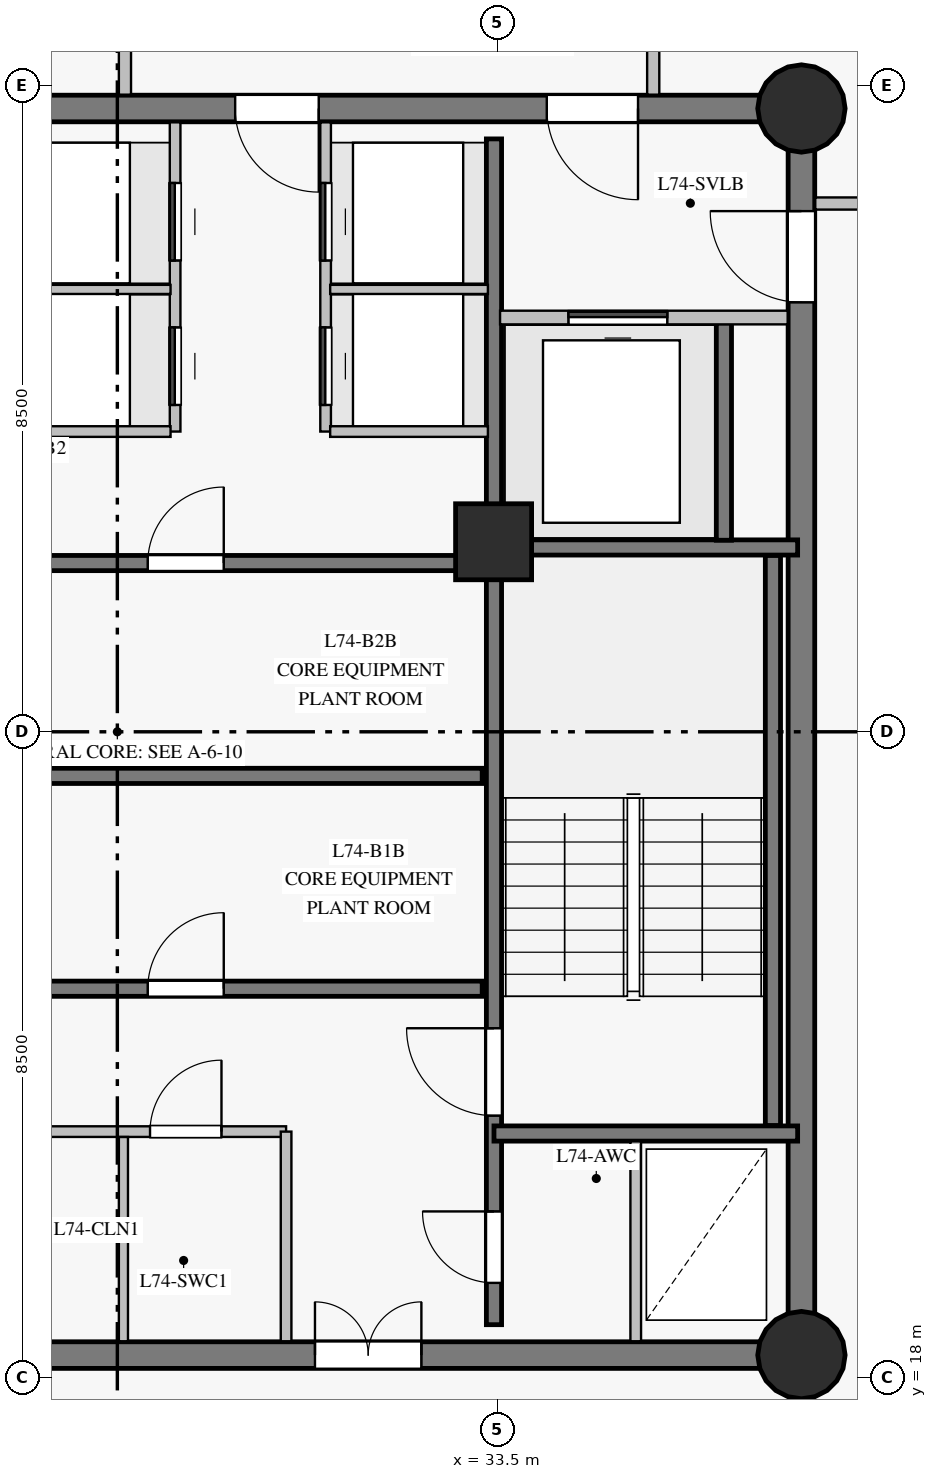
"""IFC4 building model, lengths in metres.
Left out: names, types, materials, properties, quantities, classifications, styles, units other than length and angle.
Written with IfcOpenShell. Run it as: python <this file> out.ifc"""

import sys

from ifc_helpers import new_model, si_unit, direction, frame, frame_2d, origin, origin_with_axes, origin_2d, place, context, subcontext, project, spatial, rectangle, circle, extrude, source, transform, mapped, element, fill, save


model = new_model("IFC4")
c1 = context("Model", 3, precision=1e-05, world=origin(), true_north=direction((0.0, 1.0)))
c2 = subcontext(c1, "Body", "Model", "MODEL_VIEW")
j1 = project(units=[si_unit("LENGTHUNIT", "METRE"), si_unit("PLANEANGLEUNIT", "RADIAN")], contexts=[c1])
p1 = place(None, origin())
s1 = spatial("IfcSite", under=j1, at=p1, CompositionType="ELEMENT")
p2 = place(p1, origin())
s2 = spatial("IfcBuilding", under=s1, at=p2, CompositionType="ELEMENT")
p3 = place(p2, frame((0.0, 0.0, 250.45)))
s3 = spatial("IfcBuildingStorey", under=s2, at=p3, CompositionType="ELEMENT", Elevation=250.45)
p4 = place(p3, frame((26.55, 18.3, 0.0), z_axis=(0.0, 0.0, 1.0), x_axis=(1.0, 0.0, 0.0)))
e1 = element("IfcWall", 1, at=p4, inside=s3, PredefinedType="SHEAR", context=c2, shape_type="SweptSolid", body=[
    extrude(rectangle(XDim=10.95, YDim=0.35, at=frame_2d((5.475, 0.0))), origin(), (0.0, 0.0, 1.0), 2.85),
])
p5 = place(p4, frame((4.55, 0.0, 0.0)))
e2 = element("IfcOpeningElement", 2, at=p5, cuts=e1, PredefinedType="OPENING", context=c2, shape_type="SweptSolid", body=[
    extrude(rectangle(XDim=1.4, YDim=2.2, at=frame_2d((0.7, 1.1))), frame((0.0, 0.185, 0.0), z_axis=(0.0, -1.0, 0.0), x_axis=(1.0, 0.0, 0.0)), (0.0, 0.0, 1.0), 0.37),
])
p6 = place(p3, frame((37.5, 18.3, 0.0), z_axis=(0.0, 0.0, 1.0), x_axis=(0.0, 1.0, 0.0)))
e3 = element("IfcWall", 3, at=p6, inside=s3, PredefinedType="SHEAR", context=c2, shape_type="SweptSolid", body=[
    extrude(rectangle(XDim=16.4, YDim=0.35, at=frame_2d((8.2, 0.0))), origin(), (0.0, 0.0, 1.0), 2.85),
])
p7 = place(p6, frame((13.85, 0.0, 0.0)))
e4 = element("IfcOpeningElement", 4, at=p7, cuts=e3, PredefinedType="OPENING", context=c2, shape_type="SweptSolid", body=[
    extrude(rectangle(XDim=1.2, YDim=2.15, at=frame_2d((0.6, 1.075))), frame((0.0, 0.185, 0.0), z_axis=(0.0, -1.0, 0.0), x_axis=(1.0, 0.0, 0.0)), (0.0, 0.0, 1.0), 0.37),
])
p8 = place(p3, frame((37.5, 34.7, 0.0), z_axis=(0.0, 0.0, 1.0), x_axis=(-1.0, 0.0, 0.0)))
e5 = element("IfcWall", 5, at=p8, inside=s3, PredefinedType="SHEAR", context=c2, shape_type="SweptSolid", body=[
    extrude(rectangle(XDim=10.95, YDim=0.35, at=frame_2d((5.475, 0.0))), origin(), (0.0, 0.0, 1.0), 2.85),
])
p9 = place(p8, frame((2.15, 0.0, 0.0)))
e6 = element("IfcOpeningElement", 6, at=p9, cuts=e5, PredefinedType="OPENING", context=c2, shape_type="SweptSolid", body=[
    extrude(rectangle(XDim=1.2, YDim=2.15, at=frame_2d((0.6, 1.075))), frame((0.0, 0.185, 0.0), z_axis=(0.0, -1.0, 0.0), x_axis=(1.0, 0.0, 0.0)), (0.0, 0.0, 1.0), 0.37),
])
p10 = place(p8, frame((6.35, 0.0, 0.0)))
e7 = element("IfcOpeningElement", 7, at=p10, cuts=e5, PredefinedType="OPENING", context=c2, shape_type="SweptSolid", body=[
    extrude(rectangle(XDim=1.1, YDim=2.15, at=frame_2d((0.55, 1.075))), frame((0.0, 0.185, 0.0), z_axis=(0.0, -1.0, 0.0), x_axis=(1.0, 0.0, 0.0)), (0.0, 0.0, 1.0), 0.37),
])
m1 = source(origin_with_axes(), c2, "Body", "SweptSolid", [
    extrude(circle(Radius=0.575, at=origin_2d()), origin(), (0.0, 0.0, 1.0), 3.05),
])
for number, where, z_axis, x_axis in (
    (8, (37.5, 18.3, 0.0), (0.0, 0.0, 1.0), (1.0, 0.0, 0.0)),
    (9, (37.5, 34.7, 0.0), (0.0, 0.0, 1.0), (1.0, 0.0, 0.0)),
):
    element("IfcColumn", number, at=place(p3, frame(where, z_axis=z_axis, x_axis=x_axis)), inside=s3, PredefinedType="COLUMN", context=c2, shape_type="MappedRepresentation", body=[
        mapped(m1, transform((0.0, 0.0, 0.0), scale=1.0)),
    ])
m2 = source(origin_with_axes(), c2, "Body", "SweptSolid", [
    extrude(rectangle(XDim=1.0, YDim=1.0, at=origin_2d()), origin(), (0.0, 0.0, 1.0), 3.05),
])
p11 = place(p3, frame((33.45, 29.0, 0.0), z_axis=(0.0, 0.0, 1.0), x_axis=(1.0, 0.0, 0.0)))
e10 = element("IfcColumn", 10, at=p11, inside=s3, PredefinedType="COLUMN", context=c2, shape_type="MappedRepresentation", body=[
    mapped(m2, transform((0.0, 0.0, 0.0), scale=1.0)),
])
p12 = place(p3, frame((33.455, 18.7, 0.0), z_axis=(0.0, 0.0, 1.0), x_axis=(0.0, 1.0, 0.0)))
e11 = element("IfcWall", 11, at=p12, inside=s3, PredefinedType="SHEAR", context=c2, shape_type="SweptSolid", body=[
    extrude(rectangle(XDim=15.6, YDim=0.2, at=frame_2d((7.8, 0.0))), origin(), (0.0, 0.0, 1.0), 2.85),
])
p13 = place(p12, frame((2.75, 0.0, 0.0)))
e12 = element("IfcOpeningElement", 12, at=p13, cuts=e11, PredefinedType="OPENING", context=c2, shape_type="SweptSolid", body=[
    extrude(rectangle(XDim=1.15, YDim=2.15, at=frame_2d((0.575, 1.075))), frame((0.0, 0.11, 0.0), z_axis=(0.0, -1.0, 0.0), x_axis=(1.0, 0.0, 0.0)), (0.0, 0.0, 1.0), 0.22),
])
p14 = place(p12, frame((0.55, 0.0, 0.0)))
e13 = element("IfcOpeningElement", 13, at=p14, cuts=e11, PredefinedType="OPENING", context=c2, shape_type="SweptSolid", body=[
    extrude(rectangle(XDim=0.94, YDim=2.1, at=frame_2d((0.47, 1.05))), frame((0.0, 0.11, 0.0), z_axis=(0.0, -1.0, 0.0), x_axis=(1.0, 0.0, 0.0)), (0.0, 0.0, 1.0), 0.22),
])
p15 = place(p3, frame((23.7, 23.12, 0.0), z_axis=(0.0, 0.0, 1.0), x_axis=(1.0, 0.0, 0.0)))
e14 = element("IfcWall", 14, at=p15, inside=s3, PredefinedType="SHEAR", context=c2, shape_type="SweptSolid", body=[
    extrude(rectangle(XDim=9.6, YDim=0.2, at=frame_2d((4.8, 0.0))), origin(), (0.0, 0.0, 1.0), 2.85),
])
p16 = place(p15, frame((1.1, 0.0, 0.0)))
e15 = element("IfcOpeningElement", 15, at=p16, cuts=e14, PredefinedType="OPENING", context=c2, shape_type="SweptSolid", body=[
    extrude(rectangle(XDim=0.92, YDim=2.1, at=frame_2d((0.46, 1.05))), frame((0.0, 0.11, 0.0), z_axis=(0.0, -1.0, 0.0), x_axis=(1.0, 0.0, 0.0)), (0.0, 0.0, 1.0), 0.22),
])
p17 = place(p15, frame((5.2, 0.0, 0.0)))
e16 = element("IfcOpeningElement", 16, at=p17, cuts=e14, PredefinedType="OPENING", context=c2, shape_type="SweptSolid", body=[
    extrude(rectangle(XDim=1.0, YDim=2.15, at=frame_2d((0.5, 1.075))), frame((0.0, 0.11, 0.0), z_axis=(0.0, -1.0, 0.0), x_axis=(1.0, 0.0, 0.0)), (0.0, 0.0, 1.0), 0.22),
])
p18 = place(p3, frame((23.7, 25.92, 0.0), z_axis=(0.0, 0.0, 1.0), x_axis=(1.0, 0.0, 0.0)))
e17 = element("IfcWall", 17, at=p18, inside=s3, PredefinedType="SHEAR", context=c2, shape_type="SweptSolid", body=[
    extrude(rectangle(XDim=9.6, YDim=0.2, at=frame_2d((4.8, 0.0))), origin(), (0.0, 0.0, 1.0), 2.85),
])
p19 = place(p3, frame((23.7, 28.72, 0.0), z_axis=(0.0, 0.0, 1.0), x_axis=(1.0, 0.0, 0.0)))
e18 = element("IfcWall", 18, at=p19, inside=s3, PredefinedType="SHEAR", context=c2, shape_type="SweptSolid", body=[
    extrude(rectangle(XDim=9.6, YDim=0.2, at=frame_2d((4.8, 0.0))), origin(), (0.0, 0.0, 1.0), 2.85),
])
p20 = place(p19, frame((1.1, 0.0, 0.0)))
e19 = element("IfcOpeningElement", 19, at=p20, cuts=e18, PredefinedType="OPENING", context=c2, shape_type="SweptSolid", body=[
    extrude(rectangle(XDim=0.92, YDim=2.1, at=frame_2d((0.46, 1.05))), frame((0.0, 0.11, 0.0), z_axis=(0.0, -1.0, 0.0), x_axis=(1.0, 0.0, 0.0)), (0.0, 0.0, 1.0), 0.22),
])
p21 = place(p19, frame((5.2, 0.0, 0.0)))
e20 = element("IfcOpeningElement", 20, at=p21, cuts=e18, PredefinedType="OPENING", context=c2, shape_type="SweptSolid", body=[
    extrude(rectangle(XDim=1.0, YDim=2.15, at=frame_2d((0.5, 1.075))), frame((0.0, 0.11, 0.0), z_axis=(0.0, -1.0, 0.0), x_axis=(1.0, 0.0, 0.0)), (0.0, 0.0, 1.0), 0.22),
])
p22 = place(p3, frame((37.125, 21.32, 0.0), z_axis=(0.0, 0.0, 1.0), x_axis=(0.0, 1.0, 0.0)))
e21 = element("IfcWall", 21, at=p22, inside=s3, PredefinedType="SHEAR", context=c2, shape_type="SweptSolid", body=[
    extrude(rectangle(XDim=7.5, YDim=0.2, at=frame_2d((3.75, 0.0))), origin(), (0.0, 0.0, 1.0), 2.85),
])
for number, where, z_axis, x_axis in (
    (22, (33.455, 21.215, 0.0), (0.0, 0.0, 1.0), (1.0, 0.0, 0.0)),
    (23, (33.455, 28.925, 0.0), (0.0, 0.0, 1.0), (1.0, 0.0, 0.0)),
):
    element("IfcWall", number, at=place(p3, frame(where, z_axis=z_axis, x_axis=x_axis)), inside=s3, PredefinedType="SHEAR", context=c2, shape_type="SweptSolid", body=[
        extrude(rectangle(XDim=3.995, YDim=0.2, at=frame_2d((1.998, 0.0))), origin(), (0.0, 0.0, 1.0), 2.85),
    ])
p23 = place(p3, frame((36.48, 29.02, 0.0), z_axis=(0.0, 0.0, 1.0), x_axis=(0.0, 1.0, 0.0)))
e24 = element("IfcWall", 24, at=p23, inside=s3, PredefinedType="SHEAR", context=c2, shape_type="SweptSolid", body=[
    extrude(rectangle(XDim=2.86, YDim=0.2, at=frame_2d((1.43, 0.0))), origin(), (0.0, 0.0, 1.0), 2.85),
])
p24 = place(p3, frame((37.682, 33.45, 0.0), z_axis=(0.0, 0.0, 1.0), x_axis=(1.0, 0.0, 0.0)))
e25 = element("IfcWall", 25, at=p24, inside=s3, PredefinedType="PARTITIONING", context=c2, shape_type="SweptSolid", body=[
    extrude(rectangle(XDim=4.118, YDim=0.16, at=frame_2d((2.059, 0.0))), origin(), (0.0, 0.0, 1.0), 2.85),
])
p25 = place(p3, frame((29.26, 30.45, 0.0), z_axis=(0.0, 0.0, 1.0), x_axis=(0.0, 1.0, 0.0)))
e26 = element("IfcWall", 26, at=p25, inside=s3, PredefinedType="PARTITIONING", context=c2, shape_type="SweptSolid", body=[
    extrude(rectangle(XDim=4.068, YDim=0.14, at=frame_2d((2.034, 0.0))), origin(), (0.0, 0.0, 1.0), 2.85),
])
p26 = place(p25, frame((0.35, 0.0, 0.0)))
e27 = element("IfcOpeningElement", 27, at=p26, cuts=e26, PredefinedType="OPENING", context=c2, shape_type="SweptSolid", body=[
    extrude(rectangle(XDim=1.02, YDim=2.15, at=frame_2d((0.51, 1.075))), frame((0.0, 0.08, 0.0), z_axis=(0.0, -1.0, 0.0), x_axis=(1.0, 0.0, 0.0)), (0.0, 0.0, 1.0), 0.16),
])
p27 = place(p25, frame((2.25, 0.0, 0.0)))
e28 = element("IfcOpeningElement", 28, at=p27, cuts=e26, PredefinedType="OPENING", context=c2, shape_type="SweptSolid", body=[
    extrude(rectangle(XDim=1.02, YDim=2.15, at=frame_2d((0.51, 1.075))), frame((0.0, 0.08, 0.0), z_axis=(0.0, -1.0, 0.0), x_axis=(1.0, 0.0, 0.0)), (0.0, 0.0, 1.0), 0.16),
])
p28 = place(p3, frame((31.24, 30.45, 0.0), z_axis=(0.0, 0.0, 1.0), x_axis=(0.0, 1.0, 0.0)))
e29 = element("IfcWall", 29, at=p28, inside=s3, PredefinedType="PARTITIONING", context=c2, shape_type="SweptSolid", body=[
    extrude(rectangle(XDim=4.068, YDim=0.14, at=frame_2d((2.034, 0.0))), origin(), (0.0, 0.0, 1.0), 2.85),
])
p29 = place(p28, frame((0.35, 0.0, 0.0)))
e30 = element("IfcOpeningElement", 30, at=p29, cuts=e29, PredefinedType="OPENING", context=c2, shape_type="SweptSolid", body=[
    extrude(rectangle(XDim=1.02, YDim=2.15, at=frame_2d((0.51, 1.075))), frame((0.0, 0.08, 0.0), z_axis=(0.0, -1.0, 0.0), x_axis=(1.0, 0.0, 0.0)), (0.0, 0.0, 1.0), 0.16),
])
p30 = place(p28, frame((2.25, 0.0, 0.0)))
e31 = element("IfcOpeningElement", 31, at=p30, cuts=e29, PredefinedType="OPENING", context=c2, shape_type="SweptSolid", body=[
    extrude(rectangle(XDim=1.02, YDim=2.15, at=frame_2d((0.51, 1.075))), frame((0.0, 0.08, 0.0), z_axis=(0.0, -1.0, 0.0), x_axis=(1.0, 0.0, 0.0)), (0.0, 0.0, 1.0), 0.16),
])
p31 = place(p3, frame((33.535, 31.95, 0.0), z_axis=(0.0, 0.0, 1.0), x_axis=(1.0, 0.0, 0.0)))
e32 = element("IfcWall", 32, at=p31, inside=s3, PredefinedType="PARTITIONING", context=c2, shape_type="SweptSolid", body=[
    extrude(rectangle(XDim=3.784, YDim=0.18, at=frame_2d((1.892, 0.0))), origin(), (0.0, 0.0, 1.0), 2.85),
])
p32 = place(p31, frame((0.9, 0.0, 0.0)))
e33 = element("IfcOpeningElement", 33, at=p32, cuts=e32, PredefinedType="OPENING", context=c2, shape_type="SweptSolid", body=[
    extrude(rectangle(XDim=1.3, YDim=2.2, at=frame_2d((0.65, 1.1))), frame((0.0, 0.1, 0.0), z_axis=(0.0, -1.0, 0.0), x_axis=(1.0, 0.0, 0.0)), (0.0, 0.0, 1.0), 0.2),
])
p33 = place(p3, frame((27.28, 21.24, 0.0), z_axis=(0.0, 0.0, 1.0), x_axis=(1.0, 0.0, 0.0)))
e34 = element("IfcWall", 34, at=p33, inside=s3, PredefinedType="PARTITIONING", context=c2, shape_type="SweptSolid", body=[
    extrude(rectangle(XDim=3.44, YDim=0.14, at=frame_2d((1.72, 0.0))), origin(), (0.0, 0.0, 1.0), 2.85),
])
p34 = place(p33, frame((1.65, 0.0, 0.0)))
e35 = element("IfcOpeningElement", 35, at=p34, cuts=e34, PredefinedType="OPENING", context=c2, shape_type="SweptSolid", body=[
    extrude(rectangle(XDim=0.94, YDim=2.1, at=frame_2d((0.47, 1.05))), frame((0.0, 0.08, 0.0), z_axis=(0.0, -1.0, 0.0), x_axis=(1.0, 0.0, 0.0)), (0.0, 0.0, 1.0), 0.16),
])
p35 = place(p3, frame((30.72, 18.482, 0.0), z_axis=(0.0, 0.0, 1.0), x_axis=(0.0, 1.0, 0.0)))
e36 = element("IfcWall", 36, at=p35, inside=s3, PredefinedType="PARTITIONING", context=c2, shape_type="SweptSolid", body=[
    extrude(rectangle(XDim=2.758, YDim=0.14, at=frame_2d((1.379, 0.0))), origin(), (0.0, 0.0, 1.0), 2.85),
])
p36 = place(p3, frame((26.62, 30.45, 0.0), z_axis=(0.0, 0.0, 1.0), x_axis=(1.0, 0.0, 0.0)))
e37 = element("IfcWall", 37, at=p36, inside=s3, PredefinedType="PARTITIONING", context=c2, shape_type="SweptSolid", body=[
    extrude(rectangle(XDim=2.58, YDim=0.14, at=frame_2d((1.29, 0.0))), origin(), (0.0, 0.0, 1.0), 2.85),
])
p37 = place(p3, frame((26.62, 32.32, 0.0), z_axis=(0.0, 0.0, 1.0), x_axis=(1.0, 0.0, 0.0)))
e38 = element("IfcWall", 38, at=p37, inside=s3, PredefinedType="PARTITIONING", context=c2, shape_type="SweptSolid", body=[
    extrude(rectangle(XDim=2.58, YDim=0.12, at=frame_2d((1.29, 0.0))), origin(), (0.0, 0.0, 1.0), 2.85),
])
p38 = place(p3, frame((28.58, 18.482, 0.0), z_axis=(0.0, 0.0, 1.0), x_axis=(0.0, 1.0, 0.0)))
e39 = element("IfcWall", 39, at=p38, inside=s3, PredefinedType="PARTITIONING", context=c2, shape_type="SweptSolid", body=[
    extrude(rectangle(XDim=2.687, YDim=0.12, at=frame_2d((1.344, 0.0))), origin(), (0.0, 0.0, 1.0), 2.85),
])
p39 = place(p3, frame((35.32, 18.482, 0.0), z_axis=(0.0, 0.0, 1.0), x_axis=(0.0, 1.0, 0.0)))
e40 = element("IfcWall", 40, at=p39, inside=s3, PredefinedType="PARTITIONING", context=c2, shape_type="SweptSolid", body=[
    extrude(rectangle(XDim=2.629, YDim=0.14, at=frame_2d((1.314, 0.0))), origin(), (0.0, 0.0, 1.0), 2.85),
])
p40 = place(p3, frame((31.3, 30.45, 0.0), z_axis=(0.0, 0.0, 1.0), x_axis=(1.0, 0.0, 0.0)))
e41 = element("IfcWall", 41, at=p40, inside=s3, PredefinedType="PARTITIONING", context=c2, shape_type="SweptSolid", body=[
    extrude(rectangle(XDim=2.075, YDim=0.14, at=frame_2d((1.038, 0.0))), origin(), (0.0, 0.0, 1.0), 2.85),
])
p41 = place(p3, frame((31.3, 32.32, 0.0), z_axis=(0.0, 0.0, 1.0), x_axis=(1.0, 0.0, 0.0)))
e42 = element("IfcWall", 42, at=p41, inside=s3, PredefinedType="PARTITIONING", context=c2, shape_type="SweptSolid", body=[
    extrude(rectangle(XDim=2.075, YDim=0.12, at=frame_2d((1.038, 0.0))), origin(), (0.0, 0.0, 1.0), 2.85),
])
for number, where, z_axis, x_axis in (
    (43, (28.6, 34.882, 0.0), (0.0, 0.0, 1.0), (0.0, 1.0, 0.0)),
    (44, (35.55, 36.4, 0.0), (0.0, 0.0, 1.0), (0.0, -1.0, 0.0)),
):
    element("IfcWall", number, at=place(p3, frame(where, z_axis=z_axis, x_axis=x_axis)), inside=s3, PredefinedType="PARTITIONING", context=c2, shape_type="SweptSolid", body=[
        extrude(rectangle(XDim=1.518, YDim=0.16, at=frame_2d((0.759, 0.0))), origin(), (0.0, 0.0, 1.0), 2.85),
    ])
m3 = source(origin_with_axes(), c2, "Body", "SweptSolid", [
    extrude(rectangle(XDim=1.15, YDim=2.15, at=frame_2d((0.575, 1.075))), frame((0.0, 0.025, 0.0), z_axis=(0.0, -1.0, 0.0), x_axis=(1.0, 0.0, 0.0)), (0.0, 0.0, 1.0), 0.05),
])
p42 = place(p13, origin())
e45 = element("IfcDoor", 45, at=p42, inside=s3, OperationType="SINGLE_SWING_RIGHT", PredefinedType="DOOR", context=c2, shape_type="MappedRepresentation", body=[
    mapped(m3, transform((0.0, 0.0, 0.0), scale=1.0)),
])
fill(e12, e45)
m4 = source(origin_with_axes(), c2, "Body", "SweptSolid", [
    extrude(rectangle(XDim=1.2, YDim=2.15, at=frame_2d((0.6, 1.075))), frame((0.0, 0.025, 0.0), z_axis=(0.0, -1.0, 0.0), x_axis=(1.0, 0.0, 0.0)), (0.0, 0.0, 1.0), 0.05),
])
p43 = place(p7, origin())
e46 = element("IfcDoor", 46, at=p43, inside=s3, OperationType="SINGLE_SWING_RIGHT", PredefinedType="DOOR", context=c2, shape_type="MappedRepresentation", body=[
    mapped(m4, transform((0.0, 0.0, 0.0), scale=1.0)),
])
fill(e4, e46)
p44 = place(p9, origin())
e47 = element("IfcDoor", 47, at=p44, inside=s3, OperationType="SINGLE_SWING_LEFT", PredefinedType="DOOR", context=c2, shape_type="MappedRepresentation", body=[
    mapped(m4, transform((0.0, 0.0, 0.0), scale=1.0)),
])
fill(e6, e47)
m5 = source(origin_with_axes(), c2, "Body", "SweptSolid", [
    extrude(rectangle(XDim=1.3, YDim=2.2, at=frame_2d((0.65, 1.1))), frame((0.0, 0.025, 0.0), z_axis=(0.0, -1.0, 0.0), x_axis=(1.0, 0.0, 0.0)), (0.0, 0.0, 1.0), 0.05),
])
p45 = place(p32, origin())
e48 = element("IfcDoor", 48, at=p45, inside=s3, OperationType="SLIDING_TO_LEFT", PredefinedType="DOOR", context=c2, shape_type="MappedRepresentation", body=[
    mapped(m5, transform((0.0, 0.0, 0.0), scale=1.0)),
])
fill(e33, e48)
m6 = source(origin_with_axes(), c2, "Body", "SweptSolid", [
    extrude(rectangle(XDim=1.4, YDim=2.2, at=frame_2d((0.7, 1.1))), frame((0.0, 0.025, 0.0), z_axis=(0.0, -1.0, 0.0), x_axis=(1.0, 0.0, 0.0)), (0.0, 0.0, 1.0), 0.05),
])
p46 = place(p5, origin())
e49 = element("IfcDoor", 49, at=p46, inside=s3, OperationType="DOUBLE_DOOR_SINGLE_SWING", PredefinedType="DOOR", context=c2, shape_type="MappedRepresentation", body=[
    mapped(m6, transform((0.0, 0.0, 0.0), scale=1.0)),
])
fill(e2, e49)
m7 = source(origin_with_axes(), c2, "Body", "SweptSolid", [
    extrude(rectangle(XDim=0.94, YDim=2.1, at=frame_2d((0.47, 1.05))), frame((0.0, 0.025, 0.0), z_axis=(0.0, -1.0, 0.0), x_axis=(1.0, 0.0, 0.0)), (0.0, 0.0, 1.0), 0.05),
])
p47 = place(p14, origin())
e50 = element("IfcDoor", 50, at=p47, inside=s3, OperationType="SINGLE_SWING_RIGHT", PredefinedType="DOOR", context=c2, shape_type="MappedRepresentation", body=[
    mapped(m7, transform((0.0, 0.0, 0.0), scale=1.0)),
])
fill(e13, e50)
p48 = place(p34, origin())
e51 = element("IfcDoor", 51, at=p48, inside=s3, OperationType="SINGLE_SWING_RIGHT", PredefinedType="DOOR", context=c2, shape_type="MappedRepresentation", body=[
    mapped(m7, transform((0.0, 0.0, 0.0), scale=1.0)),
])
fill(e35, e51)
m8 = source(origin_with_axes(), c2, "Body", "SweptSolid", [
    extrude(rectangle(XDim=1.0, YDim=2.15, at=frame_2d((0.5, 1.075))), frame((0.0, 0.025, 0.0), z_axis=(0.0, -1.0, 0.0), x_axis=(1.0, 0.0, 0.0)), (0.0, 0.0, 1.0), 0.05),
])
p49 = place(p17, origin())
e52 = element("IfcDoor", 52, at=p49, inside=s3, OperationType="SINGLE_SWING_RIGHT", PredefinedType="DOOR", context=c2, shape_type="MappedRepresentation", body=[
    mapped(m8, transform((0.0, 0.0, 0.0), scale=1.0)),
])
fill(e16, e52)
p50 = place(p21, origin())
e53 = element("IfcDoor", 53, at=p50, inside=s3, OperationType="SINGLE_SWING_RIGHT", PredefinedType="DOOR", context=c2, shape_type="MappedRepresentation", body=[
    mapped(m8, transform((0.0, 0.0, 0.0), scale=1.0)),
])
fill(e20, e53)
m9 = source(origin_with_axes(), c2, "Body", "SweptSolid", [
    extrude(rectangle(XDim=1.1, YDim=2.15, at=frame_2d((0.55, 1.075))), frame((0.0, 0.025, 0.0), z_axis=(0.0, -1.0, 0.0), x_axis=(1.0, 0.0, 0.0)), (0.0, 0.0, 1.0), 0.05),
])
p51 = place(p10, origin())
e54 = element("IfcDoor", 54, at=p51, inside=s3, OperationType="SINGLE_SWING_LEFT", PredefinedType="DOOR", context=c2, shape_type="MappedRepresentation", body=[
    mapped(m9, transform((0.0, 0.0, 0.0), scale=1.0)),
])
fill(e7, e54)
m10 = source(origin_with_axes(), c2, "Body", "SweptSolid", [
    extrude(rectangle(XDim=1.02, YDim=2.15, at=frame_2d((0.51, 1.075))), frame((0.0, 0.025, 0.0), z_axis=(0.0, -1.0, 0.0), x_axis=(1.0, 0.0, 0.0)), (0.0, 0.0, 1.0), 0.05),
])
p52 = place(p26, origin())
e55 = element("IfcDoor", 55, at=p52, inside=s3, OperationType="SLIDING_TO_LEFT", PredefinedType="DOOR", context=c2, shape_type="MappedRepresentation", body=[
    mapped(m10, transform((0.0, 0.0, 0.0), scale=1.0)),
])
fill(e27, e55)
p53 = place(p27, origin())
e56 = element("IfcDoor", 56, at=p53, inside=s3, OperationType="SLIDING_TO_LEFT", PredefinedType="DOOR", context=c2, shape_type="MappedRepresentation", body=[
    mapped(m10, transform((0.0, 0.0, 0.0), scale=1.0)),
])
fill(e28, e56)
p54 = place(p29, origin())
e57 = element("IfcDoor", 57, at=p54, inside=s3, OperationType="SLIDING_TO_LEFT", PredefinedType="DOOR", context=c2, shape_type="MappedRepresentation", body=[
    mapped(m10, transform((0.0, 0.0, 0.0), scale=1.0)),
])
fill(e30, e57)
p55 = place(p30, origin())
e58 = element("IfcDoor", 58, at=p55, inside=s3, OperationType="SLIDING_TO_LEFT", PredefinedType="DOOR", context=c2, shape_type="MappedRepresentation", body=[
    mapped(m10, transform((0.0, 0.0, 0.0), scale=1.0)),
])
fill(e31, e58)
save(model, sys.argv[1])
